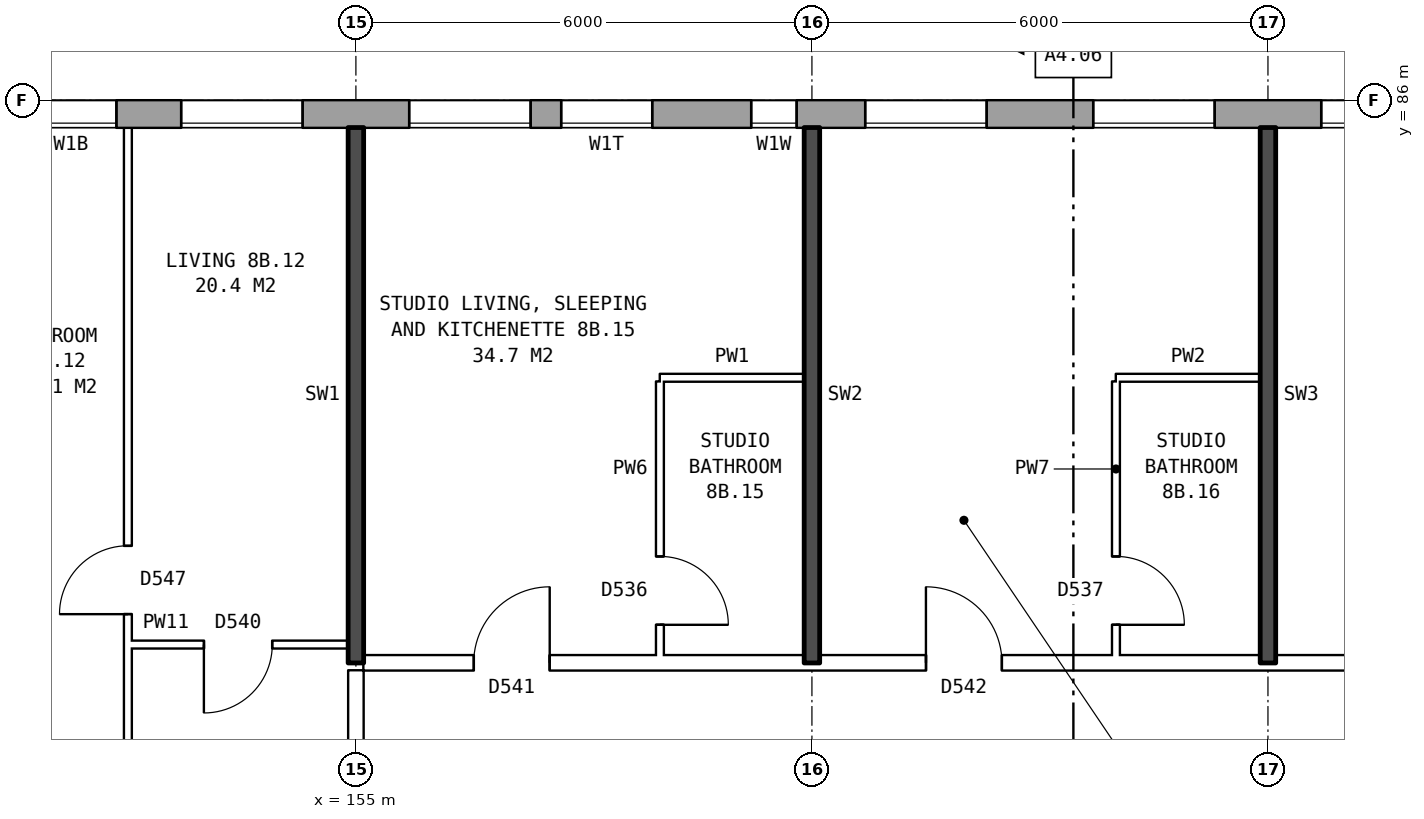
"""IFC4 building model, lengths in metres.
Left out: names, types, materials, properties, quantities, classifications, styles, units other than length and angle.
Written with IfcOpenShell. Run it as: python <this file> out.ifc"""

import sys

from ifc_helpers import new_model, si_unit, direction, frame, frame_2d, origin, place, context, subcontext, project, spatial, rectangle, extrude, element, fill, save


model = new_model("IFC4")
c1 = context("Model", 3, precision=1e-05, world=origin(), true_north=direction((0.0, 1.0)))
c2 = subcontext(c1, "Body", "Model", "MODEL_VIEW")
j1 = project(units=[si_unit("LENGTHUNIT", "METRE"), si_unit("PLANEANGLEUNIT", "RADIAN")], contexts=[c1])
p1 = place(None, origin())
s1 = spatial("IfcSite", under=j1, at=p1, CompositionType="ELEMENT")
p2 = place(p1, origin())
s2 = spatial("IfcBuilding", under=s1, at=p2, CompositionType="ELEMENT")
p3 = place(p2, frame((0.0, 0.0, 31.9)))
s3 = spatial("IfcBuildingStorey", under=s2, at=p3, CompositionType="ELEMENT", Elevation=31.9)
p4 = place(p3, frame((174.675, 85.82, 0.0), z_axis=(0.0, 0.0, 1.0), x_axis=(-1.0, 0.0, 0.0)))
e1 = element("IfcWall", 1, at=p4, inside=s3, PredefinedType="STANDARD", context=c2, shape_type="SweptSolid", body=[
    extrude(rectangle(XDim=40.601, YDim=0.36, at=frame_2d((20.3, 0.0))), origin(), (0.0, 0.0, 1.0), 2.85),
])
p5 = place(p4, frame((2.375, 0.0, 0.8)))
e2 = element("IfcOpeningElement", 2, at=p5, cuts=e1, PredefinedType="OPENING", context=c2, shape_type="SweptSolid", body=[
    extrude(rectangle(XDim=1.6, YDim=1.8, at=frame_2d((0.8, 0.9))), frame((0.0, 0.19, 0.0), z_axis=(0.0, -1.0, 0.0), x_axis=(1.0, 0.0, 0.0)), (0.0, 0.0, 1.0), 0.38),
])
p6 = place(p4, frame((5.375, 0.0, 0.8)))
e3 = element("IfcOpeningElement", 3, at=p6, cuts=e1, PredefinedType="OPENING", context=c2, shape_type="SweptSolid", body=[
    extrude(rectangle(XDim=1.6, YDim=1.8, at=frame_2d((0.8, 0.9))), frame((0.0, 0.19, 0.0), z_axis=(0.0, -1.0, 0.0), x_axis=(1.0, 0.0, 0.0)), (0.0, 0.0, 1.0), 0.38),
])
p7 = place(p4, frame((8.375, 0.0, 0.8)))
e4 = element("IfcOpeningElement", 4, at=p7, cuts=e1, PredefinedType="OPENING", context=c2, shape_type="SweptSolid", body=[
    extrude(rectangle(XDim=1.6, YDim=1.8, at=frame_2d((0.8, 0.9))), frame((0.0, 0.19, 0.0), z_axis=(0.0, -1.0, 0.0), x_axis=(1.0, 0.0, 0.0)), (0.0, 0.0, 1.0), 0.38),
])
p8 = place(p4, frame((11.375, 0.0, 0.8)))
e5 = element("IfcOpeningElement", 5, at=p8, cuts=e1, PredefinedType="OPENING", context=c2, shape_type="SweptSolid", body=[
    extrude(rectangle(XDim=1.6, YDim=1.8, at=frame_2d((0.8, 0.9))), frame((0.0, 0.19, 0.0), z_axis=(0.0, -1.0, 0.0), x_axis=(1.0, 0.0, 0.0)), (0.0, 0.0, 1.0), 0.38),
])
p9 = place(p4, frame((13.875, 0.0, 1.7)))
e6 = element("IfcOpeningElement", 6, at=p9, cuts=e1, PredefinedType="OPENING", context=c2, shape_type="SweptSolid", body=[
    extrude(rectangle(XDim=0.6, YDim=0.9, at=frame_2d((0.3, 0.45))), frame((0.0, 0.19, 0.0), z_axis=(0.0, -1.0, 0.0), x_axis=(1.0, 0.0, 0.0)), (0.0, 0.0, 1.0), 0.38),
])
p10 = place(p4, frame((17.375, 0.0, 0.8)))
e7 = element("IfcOpeningElement", 7, at=p10, cuts=e1, PredefinedType="OPENING", context=c2, shape_type="SweptSolid", body=[
    extrude(rectangle(XDim=1.6, YDim=1.8, at=frame_2d((0.8, 0.9))), frame((0.0, 0.19, 0.0), z_axis=(0.0, -1.0, 0.0), x_axis=(1.0, 0.0, 0.0)), (0.0, 0.0, 1.0), 0.38),
])
p11 = place(p4, frame((20.375, 0.0, 0.8)))
e8 = element("IfcOpeningElement", 8, at=p11, cuts=e1, PredefinedType="OPENING", context=c2, shape_type="SweptSolid", body=[
    extrude(rectangle(XDim=1.6, YDim=1.8, at=frame_2d((0.8, 0.9))), frame((0.0, 0.19, 0.0), z_axis=(0.0, -1.0, 0.0), x_axis=(1.0, 0.0, 0.0)), (0.0, 0.0, 1.0), 0.38),
])
p12 = place(p4, frame((22.825, 0.0, 0.55)))
e9 = element("IfcOpeningElement", 9, at=p12, cuts=e1, PredefinedType="OPENING", context=c2, shape_type="SweptSolid", body=[
    extrude(rectangle(XDim=1.2, YDim=1.8, at=frame_2d((0.6, 0.9))), frame((0.0, 0.19, 0.0), z_axis=(0.0, -1.0, 0.0), x_axis=(1.0, 0.0, 0.0)), (0.0, 0.0, 1.0), 0.38),
])
p13 = place(p4, frame((26.075, 0.0, 1.7)))
e10 = element("IfcOpeningElement", 10, at=p13, cuts=e1, PredefinedType="OPENING", context=c2, shape_type="SweptSolid", body=[
    extrude(rectangle(XDim=0.8, YDim=0.9, at=frame_2d((0.4, 0.45))), frame((0.0, 0.19, 0.0), z_axis=(0.0, -1.0, 0.0), x_axis=(1.0, 0.0, 0.0)), (0.0, 0.0, 1.0), 0.38),
])
p14 = place(p4, frame((29.375, 0.0, 0.8)))
e11 = element("IfcOpeningElement", 11, at=p14, cuts=e1, PredefinedType="OPENING", context=c2, shape_type="SweptSolid", body=[
    extrude(rectangle(XDim=1.6, YDim=1.8, at=frame_2d((0.8, 0.9))), frame((0.0, 0.19, 0.0), z_axis=(0.0, -1.0, 0.0), x_axis=(1.0, 0.0, 0.0)), (0.0, 0.0, 1.0), 0.38),
])
p15 = place(p4, frame((32.375, 0.0, 0.8)))
e12 = element("IfcOpeningElement", 12, at=p15, cuts=e1, PredefinedType="OPENING", context=c2, shape_type="SweptSolid", body=[
    extrude(rectangle(XDim=1.6, YDim=1.8, at=frame_2d((0.8, 0.9))), frame((0.0, 0.19, 0.0), z_axis=(0.0, -1.0, 0.0), x_axis=(1.0, 0.0, 0.0)), (0.0, 0.0, 1.0), 0.38),
])
p16 = place(p4, frame((35.375, 0.0, 0.8)))
e13 = element("IfcOpeningElement", 13, at=p16, cuts=e1, PredefinedType="OPENING", context=c2, shape_type="SweptSolid", body=[
    extrude(rectangle(XDim=1.6, YDim=1.8, at=frame_2d((0.8, 0.9))), frame((0.0, 0.19, 0.0), z_axis=(0.0, -1.0, 0.0), x_axis=(1.0, 0.0, 0.0)), (0.0, 0.0, 1.0), 0.38),
])
p17 = place(p4, frame((38.375, 0.0, 0.8)))
e14 = element("IfcOpeningElement", 14, at=p17, cuts=e1, PredefinedType="OPENING", context=c2, shape_type="SweptSolid", body=[
    extrude(rectangle(XDim=1.6, YDim=1.8, at=frame_2d((0.8, 0.9))), frame((0.0, 0.19, 0.0), z_axis=(0.0, -1.0, 0.0), x_axis=(1.0, 0.0, 0.0)), (0.0, 0.0, 1.0), 0.38),
])
p18 = place(p4, frame((15.775, 0.0, 0.8)))
e15 = element("IfcOpeningElement", 15, at=p18, cuts=e1, PredefinedType="OPENING", context=c2, shape_type="SweptSolid", body=[
    extrude(rectangle(XDim=1.2, YDim=0.9, at=frame_2d((0.6, 0.45))), frame((0.0, 0.19, 0.0), z_axis=(0.0, -1.0, 0.0), x_axis=(1.0, 0.0, 0.0)), (0.0, 0.0, 1.0), 0.38),
])
p19 = place(p4, frame((24.325, 0.0, 0.55)))
e16 = element("IfcOpeningElement", 16, at=p19, cuts=e1, PredefinedType="OPENING", context=c2, shape_type="SweptSolid", body=[
    extrude(rectangle(XDim=0.8, YDim=0.9, at=frame_2d((0.4, 0.45))), frame((0.0, 0.19, 0.0), z_axis=(0.0, -1.0, 0.0), x_axis=(1.0, 0.0, 0.0)), (0.0, 0.0, 1.0), 0.38),
])
p20 = place(p4, frame((27.175, 0.0, 0.8)))
e17 = element("IfcOpeningElement", 17, at=p20, cuts=e1, PredefinedType="OPENING", context=c2, shape_type="SweptSolid", body=[
    extrude(rectangle(XDim=1.2, YDim=1.8, at=frame_2d((0.6, 0.9))), frame((0.0, 0.19, 0.0), z_axis=(0.0, -1.0, 0.0), x_axis=(1.0, 0.0, 0.0)), (0.0, 0.0, 1.0), 0.38),
])
p21 = place(p3, frame((155.1, 78.6, 0.0), z_axis=(0.0, 0.0, 1.0), x_axis=(1.0, 0.0, 0.0)))
e18 = element("IfcWall", 18, at=p21, inside=s3, PredefinedType="PARTITIONING", context=c2, shape_type="SweptSolid", body=[
    extrude(rectangle(XDim=22.29, YDim=0.2, at=frame_2d((11.145, 0.0))), origin(), (0.0, 0.0, 1.0), 2.85),
])
p22 = place(p21, frame((1.45, 0.0, 0.0)))
e19 = element("IfcOpeningElement", 19, at=p22, cuts=e18, PredefinedType="OPENING", context=c2, shape_type="SweptSolid", body=[
    extrude(rectangle(XDim=1.0, YDim=2.1, at=frame_2d((0.5, 1.05))), frame((0.0, 0.11, 0.0), z_axis=(0.0, -1.0, 0.0), x_axis=(1.0, 0.0, 0.0)), (0.0, 0.0, 1.0), 0.22),
])
p23 = place(p21, frame((7.4, 0.0, 0.0)))
e20 = element("IfcOpeningElement", 20, at=p23, cuts=e18, PredefinedType="OPENING", context=c2, shape_type="SweptSolid", body=[
    extrude(rectangle(XDim=1.0, YDim=2.1, at=frame_2d((0.5, 1.05))), frame((0.0, 0.11, 0.0), z_axis=(0.0, -1.0, 0.0), x_axis=(1.0, 0.0, 0.0)), (0.0, 0.0, 1.0), 0.22),
])
p24 = place(p21, frame((14.4, 0.0, 0.0)))
e21 = element("IfcOpeningElement", 21, at=p24, cuts=e18, PredefinedType="OPENING", context=c2, shape_type="SweptSolid", body=[
    extrude(rectangle(XDim=1.0, YDim=2.1, at=frame_2d((0.5, 1.05))), frame((0.0, 0.11, 0.0), z_axis=(0.0, -1.0, 0.0), x_axis=(1.0, 0.0, 0.0)), (0.0, 0.0, 1.0), 0.22),
])
p25 = place(p3, frame((152.0, 78.84, 0.0), z_axis=(0.0, 0.0, 1.0), x_axis=(1.0, 0.0, 0.0)))
e22 = element("IfcWall", 22, at=p25, inside=s3, PredefinedType="PARTITIONING", context=c2, shape_type="SweptSolid", body=[
    extrude(rectangle(XDim=2.9, YDim=0.1, at=frame_2d((1.45, 0.0))), origin(), (0.0, 0.0, 1.0), 2.85),
])
p26 = place(p25, frame((1.0, 0.0, 0.0)))
e23 = element("IfcOpeningElement", 23, at=p26, cuts=e22, PredefinedType="OPENING", context=c2, shape_type="SweptSolid", body=[
    extrude(rectangle(XDim=0.9, YDim=2.1, at=frame_2d((0.45, 1.05))), frame((0.0, 0.06, 0.0), z_axis=(0.0, -1.0, 0.0), x_axis=(1.0, 0.0, 0.0)), (0.0, 0.0, 1.0), 0.12),
])
for number, where, z_axis, x_axis in (
    (24, (159.0, 82.35, 0.0), (0.0, 0.0, 1.0), (1.0, 0.0, 0.0)),
    (25, (165.0, 82.35, 0.0), (0.0, 0.0, 1.0), (1.0, 0.0, 0.0)),
):
    element("IfcWall", number, at=place(p3, frame(where, z_axis=z_axis, x_axis=x_axis)), inside=s3, PredefinedType="PARTITIONING", context=c2, shape_type="SweptSolid", body=[
        extrude(rectangle(XDim=1.9, YDim=0.1, at=frame_2d((0.95, 0.0))), origin(), (0.0, 0.0, 1.0), 2.85),
    ])
p27 = place(p3, frame((152.0, 71.3, 0.0), z_axis=(0.0, 0.0, 1.0), x_axis=(0.0, 1.0, 0.0)))
e26 = element("IfcWall", 26, at=p27, inside=s3, PredefinedType="PARTITIONING", context=c2, shape_type="SweptSolid", body=[
    extrude(rectangle(XDim=14.34, YDim=0.1, at=frame_2d((7.17, 0.0))), origin(), (0.0, 0.0, 1.0), 2.85),
])
p28 = place(p27, frame((7.94, 0.0, 0.0)))
e27 = element("IfcOpeningElement", 27, at=p28, cuts=e26, PredefinedType="OPENING", context=c2, shape_type="SweptSolid", body=[
    extrude(rectangle(XDim=0.9, YDim=2.1, at=frame_2d((0.45, 1.05))), frame((0.0, 0.06, 0.0), z_axis=(0.0, -1.0, 0.0), x_axis=(1.0, 0.0, 0.0)), (0.0, 0.0, 1.0), 0.12),
])
p29 = place(p27, frame((0.4, 0.0, 0.0)))
e28 = element("IfcOpeningElement", 28, at=p29, cuts=e26, PredefinedType="OPENING", context=c2, shape_type="SweptSolid", body=[
    extrude(rectangle(XDim=0.9, YDim=2.1, at=frame_2d((0.45, 1.05))), frame((0.0, 0.06, 0.0), z_axis=(0.0, -1.0, 0.0), x_axis=(1.0, 0.0, 0.0)), (0.0, 0.0, 1.0), 0.12),
])
p30 = place(p3, frame((155.0, 76.3, 0.0), z_axis=(0.0, 0.0, 1.0), x_axis=(0.0, 1.0, 0.0)))
e29 = element("IfcWall", 29, at=p30, inside=s3, PredefinedType="PARTITIONING", context=c2, shape_type="SweptSolid", body=[
    extrude(rectangle(XDim=2.2, YDim=0.2, at=frame_2d((1.1, 0.0))), origin(), (0.0, 0.0, 1.0), 2.85),
])
p31 = place(p3, frame((155.0, 78.6, 0.0), z_axis=(0.0, 0.0, 1.0), x_axis=(0.0, 1.0, 0.0)))
e30 = element("IfcWall", 30, at=p31, inside=s3, PredefinedType="SOLIDWALL", context=c2, shape_type="SweptSolid", body=[
    extrude(rectangle(XDim=7.04, YDim=0.2, at=frame_2d((3.52, 0.0))), origin(), (0.0, 0.0, 1.0), 2.85),
])
p32 = place(p3, frame((159.0, 78.7, 0.0), z_axis=(0.0, 0.0, 1.0), x_axis=(0.0, 1.0, 0.0)))
e31 = element("IfcWall", 31, at=p32, inside=s3, PredefinedType="PARTITIONING", context=c2, shape_type="SweptSolid", body=[
    extrude(rectangle(XDim=3.6, YDim=0.1, at=frame_2d((1.8, 0.0))), origin(), (0.0, 0.0, 1.0), 2.85),
])
p33 = place(p32, frame((0.4, 0.0, 0.0)))
e32 = element("IfcOpeningElement", 32, at=p33, cuts=e31, PredefinedType="OPENING", context=c2, shape_type="SweptSolid", body=[
    extrude(rectangle(XDim=0.9, YDim=2.1, at=frame_2d((0.45, 1.05))), frame((0.0, 0.06, 0.0), z_axis=(0.0, -1.0, 0.0), x_axis=(1.0, 0.0, 0.0)), (0.0, 0.0, 1.0), 0.12),
])
p34 = place(p3, frame((161.0, 78.6, 0.0), z_axis=(0.0, 0.0, 1.0), x_axis=(0.0, 1.0, 0.0)))
e33 = element("IfcWall", 33, at=p34, inside=s3, PredefinedType="SOLIDWALL", context=c2, shape_type="SweptSolid", body=[
    extrude(rectangle(XDim=7.04, YDim=0.2, at=frame_2d((3.52, 0.0))), origin(), (0.0, 0.0, 1.0), 2.85),
])
p35 = place(p3, frame((165.0, 78.7, 0.0), z_axis=(0.0, 0.0, 1.0), x_axis=(0.0, 1.0, 0.0)))
e34 = element("IfcWall", 34, at=p35, inside=s3, PredefinedType="PARTITIONING", context=c2, shape_type="SweptSolid", body=[
    extrude(rectangle(XDim=3.6, YDim=0.1, at=frame_2d((1.8, 0.0))), origin(), (0.0, 0.0, 1.0), 2.85),
])
p36 = place(p35, frame((0.4, 0.0, 0.0)))
e35 = element("IfcOpeningElement", 35, at=p36, cuts=e34, PredefinedType="OPENING", context=c2, shape_type="SweptSolid", body=[
    extrude(rectangle(XDim=0.9, YDim=2.1, at=frame_2d((0.45, 1.05))), frame((0.0, 0.06, 0.0), z_axis=(0.0, -1.0, 0.0), x_axis=(1.0, 0.0, 0.0)), (0.0, 0.0, 1.0), 0.12),
])
p37 = place(p3, frame((167.0, 78.6, 0.0), z_axis=(0.0, 0.0, 1.0), x_axis=(0.0, 1.0, 0.0)))
e36 = element("IfcWall", 36, at=p37, inside=s3, PredefinedType="SOLIDWALL", context=c2, shape_type="SweptSolid", body=[
    extrude(rectangle(XDim=7.04, YDim=0.2, at=frame_2d((3.52, 0.0))), origin(), (0.0, 0.0, 1.0), 2.85),
])
p38 = place(p6, origin())
e37 = element("IfcWindow", 37, at=p38, inside=s3, PartitioningType="SINGLE_PANEL", PredefinedType="WINDOW", context=c2, shape_type="SweptSolid", body=[
    extrude(rectangle(XDim=1.6, YDim=1.8, at=frame_2d((0.8, 0.9))), frame((0.0, 0.15, 0.0), z_axis=(0.0, -1.0, 0.0), x_axis=(1.0, 0.0, 0.0)), (0.0, 0.0, 1.0), 0.06),
])
fill(e3, e37)
p39 = place(p7, origin())
e38 = element("IfcWindow", 38, at=p39, inside=s3, PartitioningType="SINGLE_PANEL", PredefinedType="WINDOW", context=c2, shape_type="SweptSolid", body=[
    extrude(rectangle(XDim=1.6, YDim=1.8, at=frame_2d((0.8, 0.9))), frame((0.0, 0.15, 0.0), z_axis=(0.0, -1.0, 0.0), x_axis=(1.0, 0.0, 0.0)), (0.0, 0.0, 1.0), 0.06),
])
fill(e4, e38)
p40 = place(p8, origin())
e39 = element("IfcWindow", 39, at=p40, inside=s3, PartitioningType="SINGLE_PANEL", PredefinedType="WINDOW", context=c2, shape_type="SweptSolid", body=[
    extrude(rectangle(XDim=1.6, YDim=1.8, at=frame_2d((0.8, 0.9))), frame((0.0, 0.15, 0.0), z_axis=(0.0, -1.0, 0.0), x_axis=(1.0, 0.0, 0.0)), (0.0, 0.0, 1.0), 0.06),
])
fill(e5, e39)
p41 = place(p9, origin())
e40 = element("IfcWindow", 40, at=p41, inside=s3, PartitioningType="SINGLE_PANEL", PredefinedType="WINDOW", context=c2, shape_type="SweptSolid", body=[
    extrude(rectangle(XDim=0.6, YDim=0.9, at=frame_2d((0.3, 0.45))), frame((0.0, 0.15, 0.0), z_axis=(0.0, -1.0, 0.0), x_axis=(1.0, 0.0, 0.0)), (0.0, 0.0, 1.0), 0.06),
])
fill(e6, e40)
p42 = place(p10, origin())
e41 = element("IfcWindow", 41, at=p42, inside=s3, PartitioningType="SINGLE_PANEL", PredefinedType="WINDOW", context=c2, shape_type="SweptSolid", body=[
    extrude(rectangle(XDim=1.6, YDim=1.8, at=frame_2d((0.8, 0.9))), frame((0.0, 0.15, 0.0), z_axis=(0.0, -1.0, 0.0), x_axis=(1.0, 0.0, 0.0)), (0.0, 0.0, 1.0), 0.06),
])
fill(e7, e41)
p43 = place(p11, origin())
e42 = element("IfcWindow", 42, at=p43, inside=s3, PartitioningType="SINGLE_PANEL", PredefinedType="WINDOW", context=c2, shape_type="SweptSolid", body=[
    extrude(rectangle(XDim=1.6, YDim=1.8, at=frame_2d((0.8, 0.9))), frame((0.0, 0.15, 0.0), z_axis=(0.0, -1.0, 0.0), x_axis=(1.0, 0.0, 0.0)), (0.0, 0.0, 1.0), 0.06),
])
fill(e8, e42)
p44 = place(p12, origin())
e43 = element("IfcWindow", 43, at=p44, inside=s3, PartitioningType="SINGLE_PANEL", PredefinedType="WINDOW", context=c2, shape_type="SweptSolid", body=[
    extrude(rectangle(XDim=1.2, YDim=1.8, at=frame_2d((0.6, 0.9))), frame((0.0, 0.15, 0.0), z_axis=(0.0, -1.0, 0.0), x_axis=(1.0, 0.0, 0.0)), (0.0, 0.0, 1.0), 0.06),
])
fill(e9, e43)
p45 = place(p28, origin())
e44 = element("IfcDoor", 44, at=p45, inside=s3, OperationType="SINGLE_SWING_LEFT", PredefinedType="DOOR", context=c2, shape_type="SweptSolid", body=[
    extrude(rectangle(XDim=0.9, YDim=2.1, at=frame_2d((0.45, 1.05))), frame((0.0, 0.025, 0.0), z_axis=(0.0, -1.0, 0.0), x_axis=(1.0, 0.0, 0.0)), (0.0, 0.0, 1.0), 0.05),
])
fill(e27, e44)
p46 = place(p26, frame((0.9, 0.0, 0.0), z_axis=(0.0, 0.0, 1.0), x_axis=(-1.0, 0.0, 0.0)))
e45 = element("IfcDoor", 45, at=p46, inside=s3, OperationType="SINGLE_SWING_RIGHT", PredefinedType="DOOR", context=c2, shape_type="SweptSolid", body=[
    extrude(rectangle(XDim=0.9, YDim=2.1, at=frame_2d((0.45, 1.05))), frame((0.0, 0.025, 0.0), z_axis=(0.0, -1.0, 0.0), x_axis=(1.0, 0.0, 0.0)), (0.0, 0.0, 1.0), 0.05),
])
fill(e23, e45)
p47 = place(p22, origin())
e46 = element("IfcDoor", 46, at=p47, inside=s3, OperationType="SINGLE_SWING_RIGHT", PredefinedType="DOOR", context=c2, shape_type="SweptSolid", body=[
    extrude(rectangle(XDim=1.0, YDim=2.1, at=frame_2d((0.5, 1.05))), frame((0.0, 0.025, 0.0), z_axis=(0.0, -1.0, 0.0), x_axis=(1.0, 0.0, 0.0)), (0.0, 0.0, 1.0), 0.05),
])
fill(e19, e46)
p48 = place(p33, frame((0.9, 0.0, 0.0), z_axis=(0.0, 0.0, 1.0), x_axis=(-1.0, 0.0, 0.0)))
e47 = element("IfcDoor", 47, at=p48, inside=s3, OperationType="SINGLE_SWING_RIGHT", PredefinedType="DOOR", context=c2, shape_type="SweptSolid", body=[
    extrude(rectangle(XDim=0.9, YDim=2.1, at=frame_2d((0.45, 1.05))), frame((0.0, 0.025, 0.0), z_axis=(0.0, -1.0, 0.0), x_axis=(1.0, 0.0, 0.0)), (0.0, 0.0, 1.0), 0.05),
])
fill(e32, e47)
p49 = place(p23, origin())
e48 = element("IfcDoor", 48, at=p49, inside=s3, OperationType="SINGLE_SWING_LEFT", PredefinedType="DOOR", context=c2, shape_type="SweptSolid", body=[
    extrude(rectangle(XDim=1.0, YDim=2.1, at=frame_2d((0.5, 1.05))), frame((0.0, 0.025, 0.0), z_axis=(0.0, -1.0, 0.0), x_axis=(1.0, 0.0, 0.0)), (0.0, 0.0, 1.0), 0.05),
])
fill(e20, e48)
p50 = place(p36, frame((0.9, 0.0, 0.0), z_axis=(0.0, 0.0, 1.0), x_axis=(-1.0, 0.0, 0.0)))
e49 = element("IfcDoor", 49, at=p50, inside=s3, OperationType="SINGLE_SWING_RIGHT", PredefinedType="DOOR", context=c2, shape_type="SweptSolid", body=[
    extrude(rectangle(XDim=0.9, YDim=2.1, at=frame_2d((0.45, 1.05))), frame((0.0, 0.025, 0.0), z_axis=(0.0, -1.0, 0.0), x_axis=(1.0, 0.0, 0.0)), (0.0, 0.0, 1.0), 0.05),
])
fill(e35, e49)
p51 = place(p18, origin())
e50 = element("IfcWindow", 50, at=p51, inside=s3, PartitioningType="SINGLE_PANEL", PredefinedType="WINDOW", context=c2, shape_type="SweptSolid", body=[
    extrude(rectangle(XDim=1.2, YDim=0.9, at=frame_2d((0.6, 0.45))), frame((0.0, 0.15, 0.0), z_axis=(0.0, -1.0, 0.0), x_axis=(1.0, 0.0, 0.0)), (0.0, 0.0, 1.0), 0.06),
])
fill(e15, e50)
save(model, sys.argv[1])
